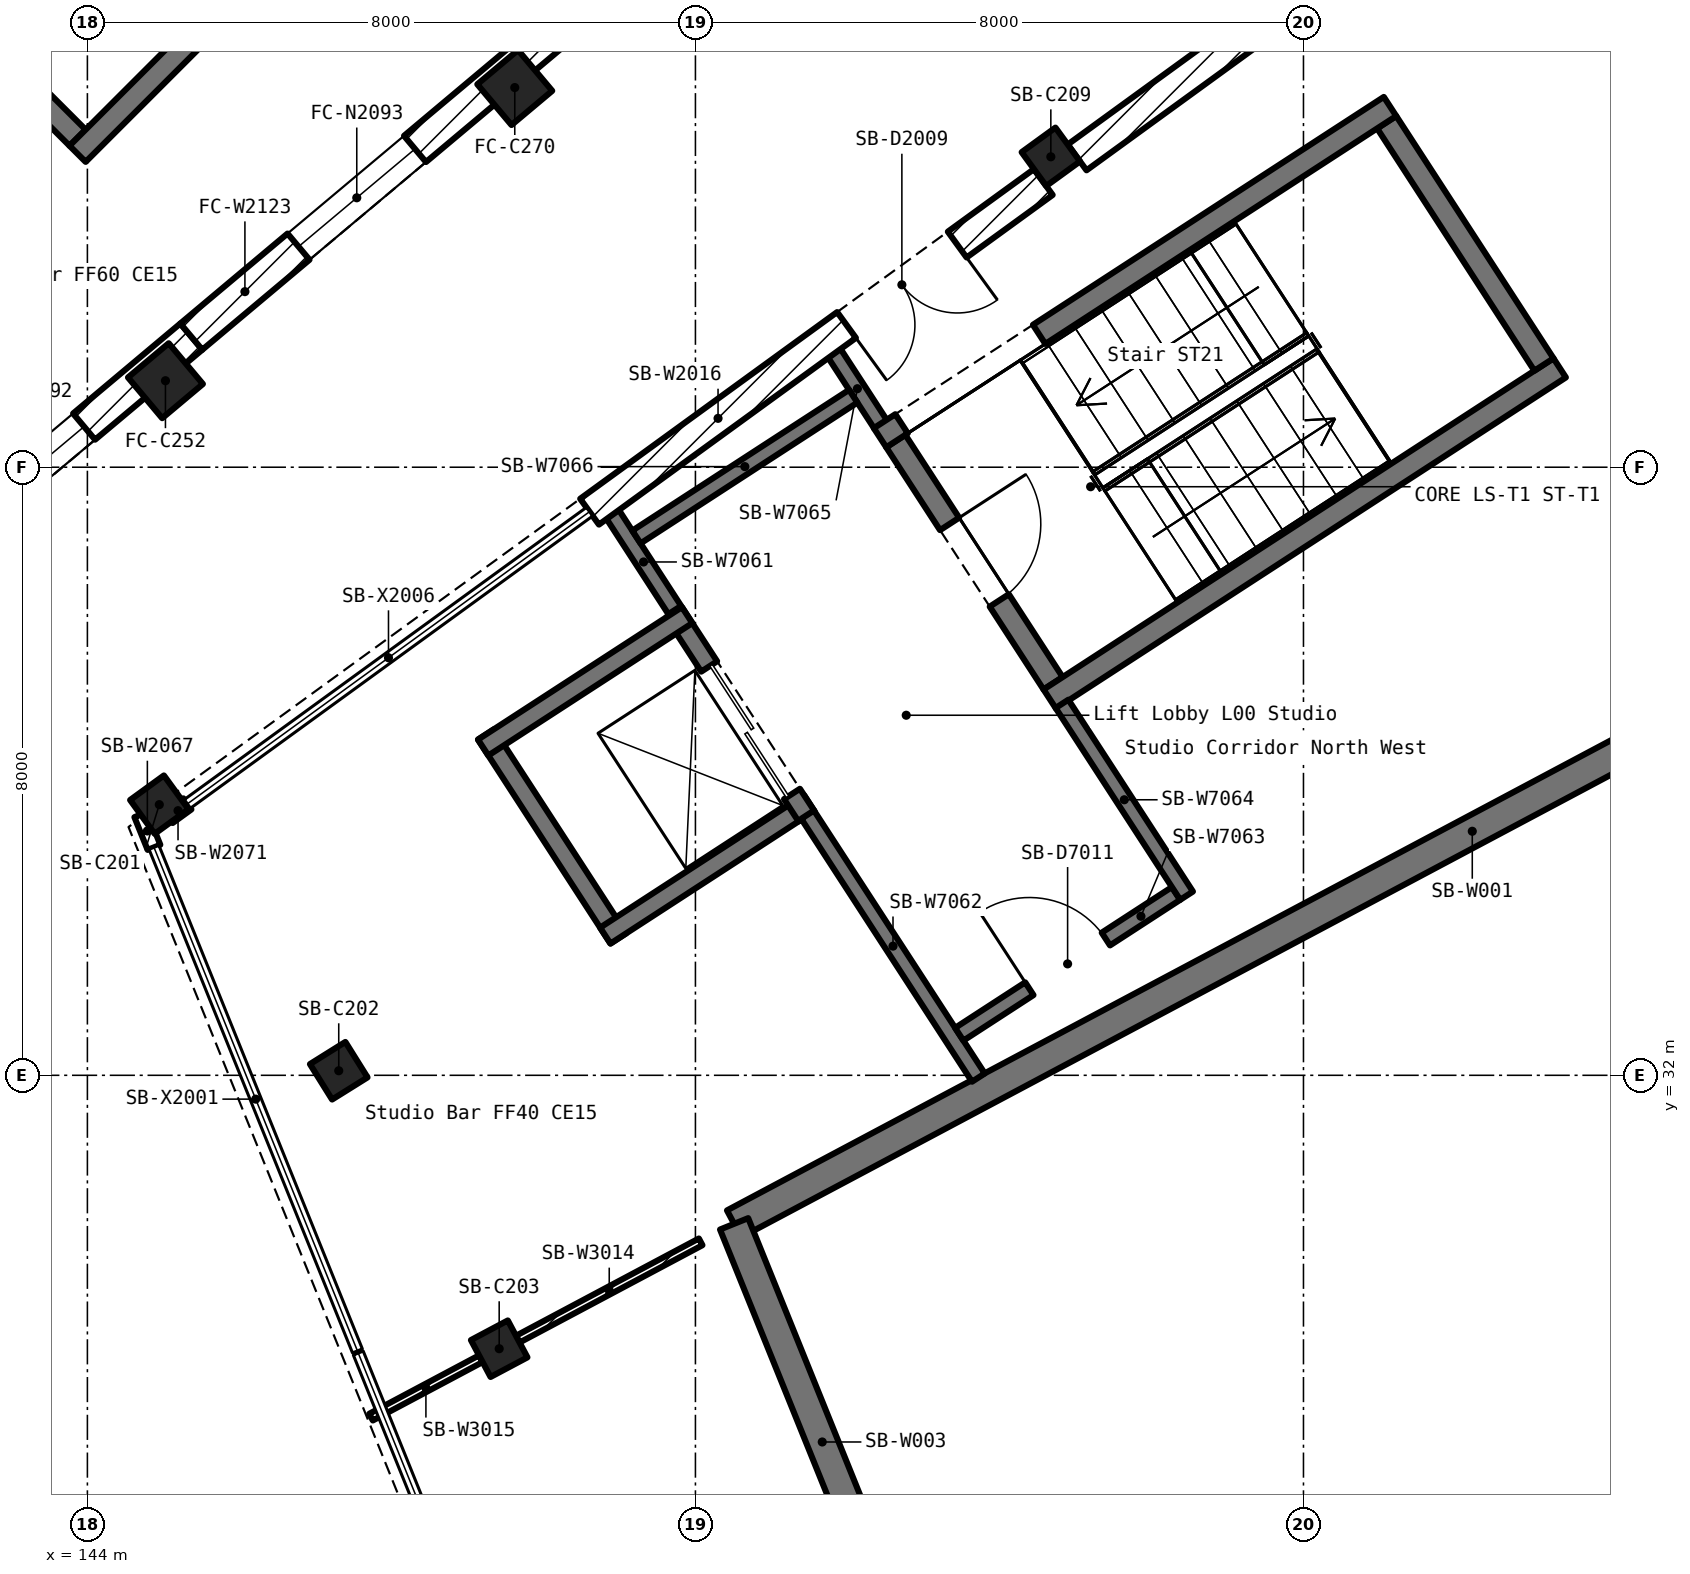
"""IFC4 building model, lengths in metres.
Left out: names, types, materials, properties, quantities, classifications, styles, units other than length and angle.
Written with IfcOpenShell. Run it as: python <this file> out.ifc"""

import sys

from ifc_helpers import new_model, si_unit, direction, frame, frame_2d, origin, origin_2d, place, context, subcontext, project, spatial, rectangle, extrude, element, fill, save


model = new_model("IFC4")
c1 = context("Model", 3, precision=1e-05, world=origin(), true_north=direction((0.0, 1.0)))
c2 = subcontext(c1, "Body", "Model", "MODEL_VIEW")
j1 = project(units=[si_unit("LENGTHUNIT", "METRE"), si_unit("PLANEANGLEUNIT", "RADIAN")], contexts=[c1])
p1 = place(None, origin())
s1 = spatial("IfcSite", under=j1, at=p1, CompositionType="ELEMENT")
p2 = place(p1, origin())
s2 = spatial("IfcBuilding", under=s1, at=p2, CompositionType="ELEMENT")
p3 = place(p2, origin())
s3 = spatial("IfcBuildingStorey", under=s2, at=p3, CompositionType="ELEMENT", Elevation=0.0)
for number, where, z_axis, x_axis in (
    (1, (145.027, 41.138, 0.0), (0.0, 0.0, 1.0), (0.643, -0.766, 0.0)),
    (2, (149.623, 44.995, 0.0), (0.0, 0.0, 1.0), (0.643, -0.766, 0.0)),
):
    element("IfcColumn", number, at=place(p3, frame(where, z_axis=z_axis, x_axis=x_axis)), inside=s3, PredefinedType="COLUMN", context=c2, shape_type="SweptSolid", body=[
        extrude(rectangle(XDim=0.7, YDim=0.7, at=origin_2d()), origin(), (0.0, 0.0, 1.0), 6.0),
    ])
for number, where, z_axis, x_axis in (
    (3, (144.946, 35.561, 0.0), (0.0, 0.0, 1.0), (0.588, -0.809, 0.0)),
    (4, (147.307, 32.06, 0.0), (0.0, 0.0, 1.0), (0.53, -0.848, 0.0)),
    (5, (149.418, 28.403, 0.0), (0.0, 0.0, 1.0), (0.469, -0.883, 0.0)),
    (6, (156.676, 44.084, 0.0), (0.0, 0.0, 1.0), (0.588, -0.809, 0.0)),
):
    element("IfcColumn", number, at=place(p3, frame(where, z_axis=z_axis, x_axis=x_axis)), inside=s3, PredefinedType="COLUMN", context=c2, shape_type="SweptSolid", body=[
        extrude(rectangle(XDim=0.55, YDim=0.55, at=origin_2d()), origin(), (0.0, 0.0, 1.0), 6.0),
    ])
p4 = place(p3, frame((171.933, 40.375, -6.3), z_axis=(0.0, 0.0, 1.0), x_axis=(-0.882926128241, -0.469511929634, 0.0)))
e7 = element("IfcWall", 7, at=p4, inside=s3, PredefinedType="SHEAR", context=c2, shape_type="SweptSolid", body=[
    extrude(rectangle(XDim=22.0, YDim=0.4, at=frame_2d((11.0, 0.0))), origin(), (0.0, 0.0, 1.0), 12.3),
])
p5 = place(p3, frame((152.509, 30.046, -6.3), z_axis=(0.0, 0.0, 1.0), x_axis=(0.374613299166, -0.92718114524, 0.0)))
e8 = element("IfcWall", 8, at=p5, inside=s3, PredefinedType="SHEAR", context=c2, shape_type="SweptSolid", body=[
    extrude(rectangle(XDim=13.379, YDim=0.4, at=frame_2d((6.689, 0.0))), origin(), (0.0, 0.0, 1.0), 12.3),
])
p6 = place(p5, frame((6.191, 0.0, 6.3)))
e9 = element("IfcOpeningElement", 9, at=p6, cuts=e8, PredefinedType="OPENING", context=c2, shape_type="SweptSolid", body=[
    extrude(rectangle(XDim=1.0, YDim=2.1, at=frame_2d((0.5, 1.05))), frame((0.0, 0.212, 0.0), z_axis=(0.0, -1.0, 0.0), x_axis=(1.0, 0.0, 0.0)), (0.0, 0.0, 1.0), 0.424),
])
p7 = place(p3, frame((141.013, 38.065, 0.0), z_axis=(0.0, 0.0, 1.0), x_axis=(0.766076229388, 0.642749726384, 0.0)))
e10 = element("IfcWall", 10, at=p7, inside=s3, PredefinedType="SOLIDWALL", context=c2, shape_type="SweptSolid", body=[
    extrude(rectangle(XDim=5.684, YDim=0.45, at=frame_2d((2.842, 0.0))), origin(), (0.0, 0.0, 1.0), 4.98),
])
p8 = place(p7, frame((1.842, 0.0, 1.0)))
e11 = element("IfcOpeningElement", 11, at=p8, cuts=e10, PredefinedType="OPENING", context=c2, shape_type="SweptSolid", body=[
    extrude(rectangle(XDim=2.0, YDim=2.8, at=frame_2d((1.0, 1.4))), frame((0.0, 0.237, 0.0), z_axis=(0.0, -1.0, 0.0), x_axis=(1.0, 0.0, 0.0)), (0.0, 0.0, 1.0), 0.474),
])
p9 = place(p3, frame((145.367, 41.718, 0.0), z_axis=(0.0, 0.0, 1.0), x_axis=(0.766076229388, 0.642749726384, 0.0)))
e12 = element("IfcWall", 12, at=p9, inside=s3, PredefinedType="SOLIDWALL", context=c2, shape_type="SweptSolid", body=[
    extrude(rectangle(XDim=5.684, YDim=0.45, at=frame_2d((2.842, 0.0))), origin(), (0.0, 0.0, 1.0), 4.98),
])
p10 = place(p9, frame((1.842, 0.0, 1.0)))
e13 = element("IfcOpeningElement", 13, at=p10, cuts=e12, PredefinedType="OPENING", context=c2, shape_type="SweptSolid", body=[
    extrude(rectangle(XDim=2.0, YDim=2.8, at=frame_2d((1.0, 1.4))), frame((0.0, 0.237, 0.0), z_axis=(0.0, -1.0, 0.0), x_axis=(1.0, 0.0, 0.0)), (0.0, 0.0, 1.0), 0.474),
])
p11 = place(p3, frame((149.721, 45.371, 0.0), z_axis=(0.0, 0.0, 1.0), x_axis=(0.766097380859, 0.642724515668, 0.0)))
e14 = element("IfcWall", 14, at=p11, inside=s3, PredefinedType="SOLIDWALL", context=c2, shape_type="SweptSolid", body=[
    extrude(rectangle(XDim=5.683, YDim=0.45, at=frame_2d((2.842, 0.0))), origin(), (0.0, 0.0, 1.0), 4.98),
])
p12 = place(p11, frame((1.842, 0.0, 1.0)))
e15 = element("IfcOpeningElement", 15, at=p12, cuts=e14, PredefinedType="OPENING", context=c2, shape_type="SweptSolid", body=[
    extrude(rectangle(XDim=2.0, YDim=2.8, at=frame_2d((1.0, 1.4))), frame((0.0, 0.237, 0.0), z_axis=(0.0, -1.0, 0.0), x_axis=(1.0, 0.0, 0.0)), (0.0, 0.0, 1.0), 0.474),
])
p13 = place(p3, frame((162.568, 48.105, 0.0), z_axis=(0.0, 0.0, 1.0), x_axis=(-0.809048605298, -0.587741741129, 0.0)))
e16 = element("IfcWall", 16, at=p13, inside=s3, PredefinedType="SOLIDWALL", context=c2, shape_type="SweptSolid", body=[
    extrude(rectangle(XDim=6.855, YDim=0.42, at=frame_2d((3.428, 0.0))), origin(), (0.0, 0.0, 1.0), 4.98),
])
p14 = place(p3, frame((156.577, 43.752, 0.0), z_axis=(0.0, 0.0, 1.0), x_axis=(-0.809050732127, -0.587738813458, 0.0)))
e17 = element("IfcWall", 17, at=p14, inside=s3, PredefinedType="SOLIDWALL", context=c2, shape_type="SweptSolid", body=[
    extrude(rectangle(XDim=7.379, YDim=0.42, at=frame_2d((3.689, 0.0))), origin(), (0.0, 0.0, 1.0), 4.98),
])
p15 = place(p14, frame((1.4, 0.0, 0.0)))
e18 = element("IfcOpeningElement", 18, at=p15, cuts=e17, PredefinedType="OPENING", context=c2, shape_type="SweptSolid", body=[
    extrude(rectangle(XDim=1.8, YDim=2.4, at=frame_2d((0.9, 1.2))), frame((0.0, 0.222, 0.0), z_axis=(0.0, -1.0, 0.0), x_axis=(1.0, 0.0, 0.0)), (0.0, 0.0, 1.0), 0.444),
])
p16 = place(p3, frame((154.636, 40.344, 0.0), z_axis=(0.0, 0.0, 1.0), x_axis=(0.544712834543, -0.838622637355, 0.0)))
e19 = element("IfcWall", 19, at=p16, inside=s3, PredefinedType="SOLIDWALL", context=c2, shape_type="SweptSolid", body=[
    extrude(rectangle(XDim=3.8, YDim=0.3, at=frame_2d((1.9, 0.0))), origin(), (0.0, 0.0, 1.0), 6.0),
])
p17 = place(p16, frame((1.3, 0.0, 0.0)))
e20 = element("IfcOpeningElement", 20, at=p17, cuts=e19, PredefinedType="OPENING", context=c2, shape_type="SweptSolid", body=[
    extrude(rectangle(XDim=1.2, YDim=2.1, at=frame_2d((0.6, 1.05))), frame((0.0, 0.162, 0.0), z_axis=(0.0, -1.0, 0.0), x_axis=(1.0, 0.0, 0.0)), (0.0, 0.0, 1.0), 0.324),
])
p18 = place(p3, frame((156.662, 36.95, 0.0), z_axis=(0.0, 0.0, 1.0), x_axis=(0.838666673849, 0.544645031351, 0.0)))
e21 = element("IfcWall", 21, at=p18, inside=s3, PredefinedType="SOLIDWALL", context=c2, shape_type="SweptSolid", body=[
    extrude(rectangle(XDim=8.0, YDim=0.3, at=frame_2d((4.0, 0.0))), origin(), (0.0, 0.0, 1.0), 6.0),
])
p19 = place(p3, frame((163.164, 41.351, 0.0), z_axis=(0.0, 0.0, 1.0), x_axis=(-0.544414712312, 0.838816202167, 0.0)))
e22 = element("IfcWall", 22, at=p19, inside=s3, PredefinedType="SOLIDWALL", context=c2, shape_type="SweptSolid", body=[
    extrude(rectangle(XDim=3.801, YDim=0.3, at=frame_2d((1.9, 0.0))), origin(), (0.0, 0.0, 1.0), 6.0),
])
p20 = place(p3, frame((140.335, 47.871, 0.0), z_axis=(0.0, 0.0, 1.0), x_axis=(0.707106781187, -0.707106781187, 0.0)))
e23 = element("IfcWall", 23, at=p20, inside=s3, PredefinedType="SOLIDWALL", context=c2, shape_type="SweptSolid", body=[
    extrude(rectangle(XDim=5.001, YDim=0.3, at=frame_2d((2.5, 0.0))), origin(), (0.0, 0.0, 1.0), 6.0),
])
p21 = place(p20, frame((1.9, 0.0, 0.0)))
e24 = element("IfcOpeningElement", 24, at=p21, cuts=e23, PredefinedType="OPENING", context=c2, shape_type="SweptSolid", body=[
    extrude(rectangle(XDim=1.2, YDim=2.1, at=frame_2d((0.6, 1.05))), frame((0.0, 0.162, 0.0), z_axis=(0.0, -1.0, 0.0), x_axis=(1.0, 0.0, 0.0)), (0.0, 0.0, 1.0), 0.324),
])
p22 = place(p3, frame((143.871, 44.123, 0.0), z_axis=(0.0, 0.0, 1.0), x_axis=(0.7070945738, 0.707118988363, 0.0)))
e25 = element("IfcWall", 25, at=p22, inside=s3, PredefinedType="SOLIDWALL", context=c2, shape_type="SweptSolid", body=[
    extrude(rectangle(XDim=10.0, YDim=0.3, at=frame_2d((5.0, 0.0))), origin(), (0.0, 0.0, 1.0), 6.0),
])
for number, where, z_axis, x_axis in (
    (26, (149.244, 36.485, 0.0), (0.0, 0.0, 1.0), (0.545, -0.839, 0.0)),
    (27, (150.814, 33.838, 0.0), (0.0, 0.0, 1.0), (0.839, 0.545, 0.0)),
):
    element("IfcWall", number, at=place(p3, frame(where, z_axis=z_axis, x_axis=x_axis)), inside=s3, PredefinedType="SOLIDWALL", context=c2, shape_type="SweptSolid", body=[
        extrude(rectangle(XDim=3.2, YDim=0.25, at=frame_2d((1.6, 0.0))), origin(), (0.0, 0.0, 1.0), 6.0),
    ])
p23 = place(p3, frame((153.461, 35.408, 0.0), z_axis=(0.0, 0.0, 1.0), x_axis=(-0.544746938909, 0.838600484467, 0.0)))
e28 = element("IfcWall", 28, at=p23, inside=s3, PredefinedType="SOLIDWALL", context=c2, shape_type="SweptSolid", body=[
    extrude(rectangle(XDim=3.199, YDim=0.25, at=frame_2d((1.6, 0.0))), origin(), (0.0, 0.0, 1.0), 6.0),
])
p24 = place(p23, frame((0.35, 0.0, 0.0)))
e29 = element("IfcOpeningElement", 29, at=p24, cuts=e28, PredefinedType="OPENING", context=c2, shape_type="SweptSolid", body=[
    extrude(rectangle(XDim=2.0, YDim=2.2, at=frame_2d((1.0, 1.1))), frame((0.0, 0.137, 0.0), z_axis=(0.0, -1.0, 0.0), x_axis=(1.0, 0.0, 0.0)), (0.0, 0.0, 1.0), 0.274),
])
p25 = place(p3, frame((151.891, 38.054, 0.0), z_axis=(0.0, 0.0, 1.0), x_axis=(-0.838830397361, -0.544392840201, 0.0)))
e30 = element("IfcWall", 30, at=p25, inside=s3, PredefinedType="SOLIDWALL", context=c2, shape_type="SweptSolid", body=[
    extrude(rectangle(XDim=3.2, YDim=0.25, at=frame_2d((1.6, 0.0))), origin(), (0.0, 0.0, 1.0), 6.0),
])
p26 = place(p3, frame((150.907, 39.386, 0.0), z_axis=(0.0, 0.0, 1.0), x_axis=(0.54445901867, -0.838787444463, 0.0)))
e31 = element("IfcWall", 31, at=p26, inside=s3, PredefinedType="PARTITIONING", context=c2, shape_type="SweptSolid", body=[
    extrude(rectangle(XDim=1.508, YDim=0.2, at=frame_2d((0.754, 0.0))), origin(), (0.0, 0.0, 1.0), 5.78),
])
p27 = place(p3, frame((153.476, 35.429, 0.0), z_axis=(0.0, 0.0, 1.0), x_axis=(0.544730341518, -0.838611265742, 0.0)))
e32 = element("IfcWall", 32, at=p27, inside=s3, PredefinedType="PARTITIONING", context=c2, shape_type="SweptSolid", body=[
    extrude(rectangle(XDim=4.125, YDim=0.2, at=frame_2d((2.062, 0.0))), origin(), (0.0, 0.0, 1.0), 5.78),
])
p28 = place(p3, frame((155.471, 32.54, 0.0), z_axis=(0.0, 0.0, 1.0), x_axis=(0.838683012783, 0.544619871167, 0.0)))
e33 = element("IfcWall", 33, at=p28, inside=s3, PredefinedType="PARTITIONING", context=c2, shape_type="SweptSolid", body=[
    extrude(rectangle(XDim=3.401, YDim=0.2, at=frame_2d((1.7, 0.0))), origin(), (0.0, 0.0, 1.0), 5.78),
])
p29 = place(p28, frame((1.1, 0.0, 0.0)))
e34 = element("IfcOpeningElement", 34, at=p29, cuts=e33, PredefinedType="OPENING", context=c2, shape_type="SweptSolid", body=[
    extrude(rectangle(XDim=1.2, YDim=2.1, at=frame_2d((0.6, 1.05))), frame((0.0, 0.112, 0.0), z_axis=(0.0, -1.0, 0.0), x_axis=(1.0, 0.0, 0.0)), (0.0, 0.0, 1.0), 0.224),
])
p30 = place(p3, frame((158.462, 34.363, 0.0), z_axis=(0.0, 0.0, 1.0), x_axis=(-0.544606183959, 0.838691900756, 0.0)))
e35 = element("IfcWall", 35, at=p30, inside=s3, PredefinedType="PARTITIONING", context=c2, shape_type="SweptSolid", body=[
    extrude(rectangle(XDim=3.009, YDim=0.2, at=frame_2d((1.505, 0.0))), origin(), (0.0, 0.0, 1.0), 5.78),
])
p31 = place(p3, frame((154.438, 40.561, 0.0), z_axis=(0.0, 0.0, 1.0), x_axis=(-0.545308400226, 0.838235497127, 0.0)))
e36 = element("IfcWall", 36, at=p31, inside=s3, PredefinedType="PARTITIONING", context=c2, shape_type="SweptSolid", body=[
    extrude(rectangle(XDim=1.126, YDim=0.2, at=frame_2d((0.563, 0.0))), origin(), (0.0, 0.0, 1.0), 5.78),
])
p32 = place(p3, frame((154.076, 40.934, 0.0), z_axis=(0.0, 0.0, 1.0), x_axis=(-0.838661716351, -0.544652665032, 0.0)))
e37 = element("IfcWall", 37, at=p32, inside=s3, PredefinedType="PARTITIONING", context=c2, shape_type="SweptSolid", body=[
    extrude(rectangle(XDim=3.4, YDim=0.2, at=frame_2d((1.7, 0.0))), origin(), (0.0, 0.0, 1.0), 5.78),
])
p33 = place(p3, frame((149.663, 28.529, 0.0), z_axis=(0.0, 0.0, 1.0), x_axis=(0.882836035131, 0.469681312247, 0.0)))
e38 = element("IfcWall", 38, at=p33, inside=s3, PredefinedType="PARTITIONING", context=c2, shape_type="SweptSolid", body=[
    extrude(rectangle(XDim=2.725, YDim=0.1, at=frame_2d((1.363, 0.0))), origin(), (0.0, 0.0, 1.0), 4.88),
])
p34 = place(p3, frame((147.732, 27.503, 0.0), z_axis=(0.0, 0.0, 1.0), x_axis=(0.882889505907, 0.469580792153, 0.0)))
e39 = element("IfcWall", 39, at=p34, inside=s3, PredefinedType="PARTITIONING", context=c2, shape_type="SweptSolid", body=[
    extrude(rectangle(XDim=1.636, YDim=0.1, at=frame_2d((0.818, 0.0))), origin(), (0.0, 0.0, 1.0), 4.88),
])
p35 = place(p3, frame((161.139, 44.746, 0.0), z_axis=(0.0, 0.0, 1.0), x_axis=(-0.838689751227, -0.544609494213, 0.0)))
e40 = element("IfcWall", 40, at=p35, inside=s3, PredefinedType="SOLIDWALL", context=c2, shape_type="SweptSolid", body=[
    extrude(rectangle(XDim=5.505, YDim=0.3, at=frame_2d((2.752, 0.0))), origin(), (0.0, 0.0, 1.0), 6.0),
])
p36 = place(p3, frame((154.712, 40.572, 0.0), z_axis=(0.0, 0.0, 1.0), x_axis=(-0.838228741639, -0.545318784466, 0.0)))
e41 = element("IfcWall", 41, at=p36, inside=s3, PredefinedType="SOLIDWALL", context=c2, shape_type="SweptSolid", body=[
    extrude(rectangle(XDim=0.338, YDim=0.3, at=frame_2d((0.169, 0.0))), origin(), (0.0, 0.0, 1.0), 6.0),
])
p37 = place(p3, frame((144.876, 34.999, 0.0), z_axis=(0.0, 0.0, 1.0), x_axis=(-0.374558592096, 0.927203246914, 0.0)))
e42 = element("IfcWall", 42, at=p37, inside=s3, PredefinedType="SOLIDWALL", context=c2, shape_type="SweptSolid", body=[
    extrude(rectangle(XDim=0.465, YDim=0.18, at=frame_2d((0.232, 0.0))), origin(), (0.0, 0.0, 1.0), 4.93),
])
p38 = place(p3, frame((145.316, 35.571, 0.0), z_axis=(0.0, 0.0, 1.0), x_axis=(-0.809600929575, -0.586980693747, 0.0)))
e43 = element("IfcWall", 43, at=p38, inside=s3, PredefinedType="SOLIDWALL", context=c2, shape_type="SweptSolid", body=[
    extrude(rectangle(XDim=0.305, YDim=0.18, at=frame_2d((0.152, 0.0))), origin(), (0.0, 0.0, 1.0), 4.13),
])
p39 = place(p8, origin())
e44 = element("IfcWindow", 44, at=p39, inside=s3, PartitioningType="DOUBLE_PANEL_VERTICAL", PredefinedType="WINDOW", context=c2, shape_type="SweptSolid", body=[
    extrude(rectangle(XDim=2.0, YDim=2.8, at=frame_2d((1.0, 1.4))), frame((0.0, 0.03, 0.0), z_axis=(0.0, -1.0, 0.0), x_axis=(1.0, 0.0, 0.0)), (0.0, 0.0, 1.0), 0.06),
])
fill(e11, e44)
p40 = place(p10, origin())
e45 = element("IfcWindow", 45, at=p40, inside=s3, PartitioningType="DOUBLE_PANEL_VERTICAL", PredefinedType="WINDOW", context=c2, shape_type="SweptSolid", body=[
    extrude(rectangle(XDim=2.0, YDim=2.8, at=frame_2d((1.0, 1.4))), frame((0.0, 0.03, 0.0), z_axis=(0.0, -1.0, 0.0), x_axis=(1.0, 0.0, 0.0)), (0.0, 0.0, 1.0), 0.06),
])
fill(e13, e45)
p41 = place(p17, origin())
e46 = element("IfcDoor", 46, at=p41, inside=s3, OperationType="SINGLE_SWING_LEFT", PredefinedType="DOOR", context=c2, shape_type="SweptSolid", body=[
    extrude(rectangle(XDim=1.2, YDim=2.1, at=frame_2d((0.6, 1.05))), frame((0.0, 0.025, 0.0), z_axis=(0.0, -1.0, 0.0), x_axis=(1.0, 0.0, 0.0)), (0.0, 0.0, 1.0), 0.05),
])
fill(e20, e46)
p42 = place(p24, origin())
e47 = element("IfcDoor", 47, at=p42, inside=s3, OperationType="DOUBLE_DOOR_SLIDING", PredefinedType="DOOR", context=c2, shape_type="SweptSolid", body=[
    extrude(rectangle(XDim=2.0, YDim=2.2, at=frame_2d((1.0, 1.1))), frame((0.0, 0.025, 0.0), z_axis=(0.0, -1.0, 0.0), x_axis=(1.0, 0.0, 0.0)), (0.0, 0.0, 1.0), 0.05),
])
fill(e29, e47)
p43 = place(p29, origin())
e48 = element("IfcDoor", 48, at=p43, inside=s3, OperationType="SINGLE_SWING_LEFT", PredefinedType="DOOR", context=c2, shape_type="SweptSolid", body=[
    extrude(rectangle(XDim=1.2, YDim=2.1, at=frame_2d((0.6, 1.05))), frame((0.0, 0.025, 0.0), z_axis=(0.0, -1.0, 0.0), x_axis=(1.0, 0.0, 0.0)), (0.0, 0.0, 1.0), 0.05),
])
fill(e34, e48)
p44 = place(p15, origin())
e49 = element("IfcDoor", 49, at=p44, inside=s3, OperationType="DOUBLE_DOOR_DOUBLE_SWING", PredefinedType="DOOR", context=c2, shape_type="SweptSolid", body=[
    extrude(rectangle(XDim=1.8, YDim=2.4, at=frame_2d((0.9, 1.2))), frame((0.0, 0.025, 0.0), z_axis=(0.0, -1.0, 0.0), x_axis=(1.0, 0.0, 0.0)), (0.0, 0.0, 1.0), 0.05),
])
fill(e18, e49)
save(model, sys.argv[1])
